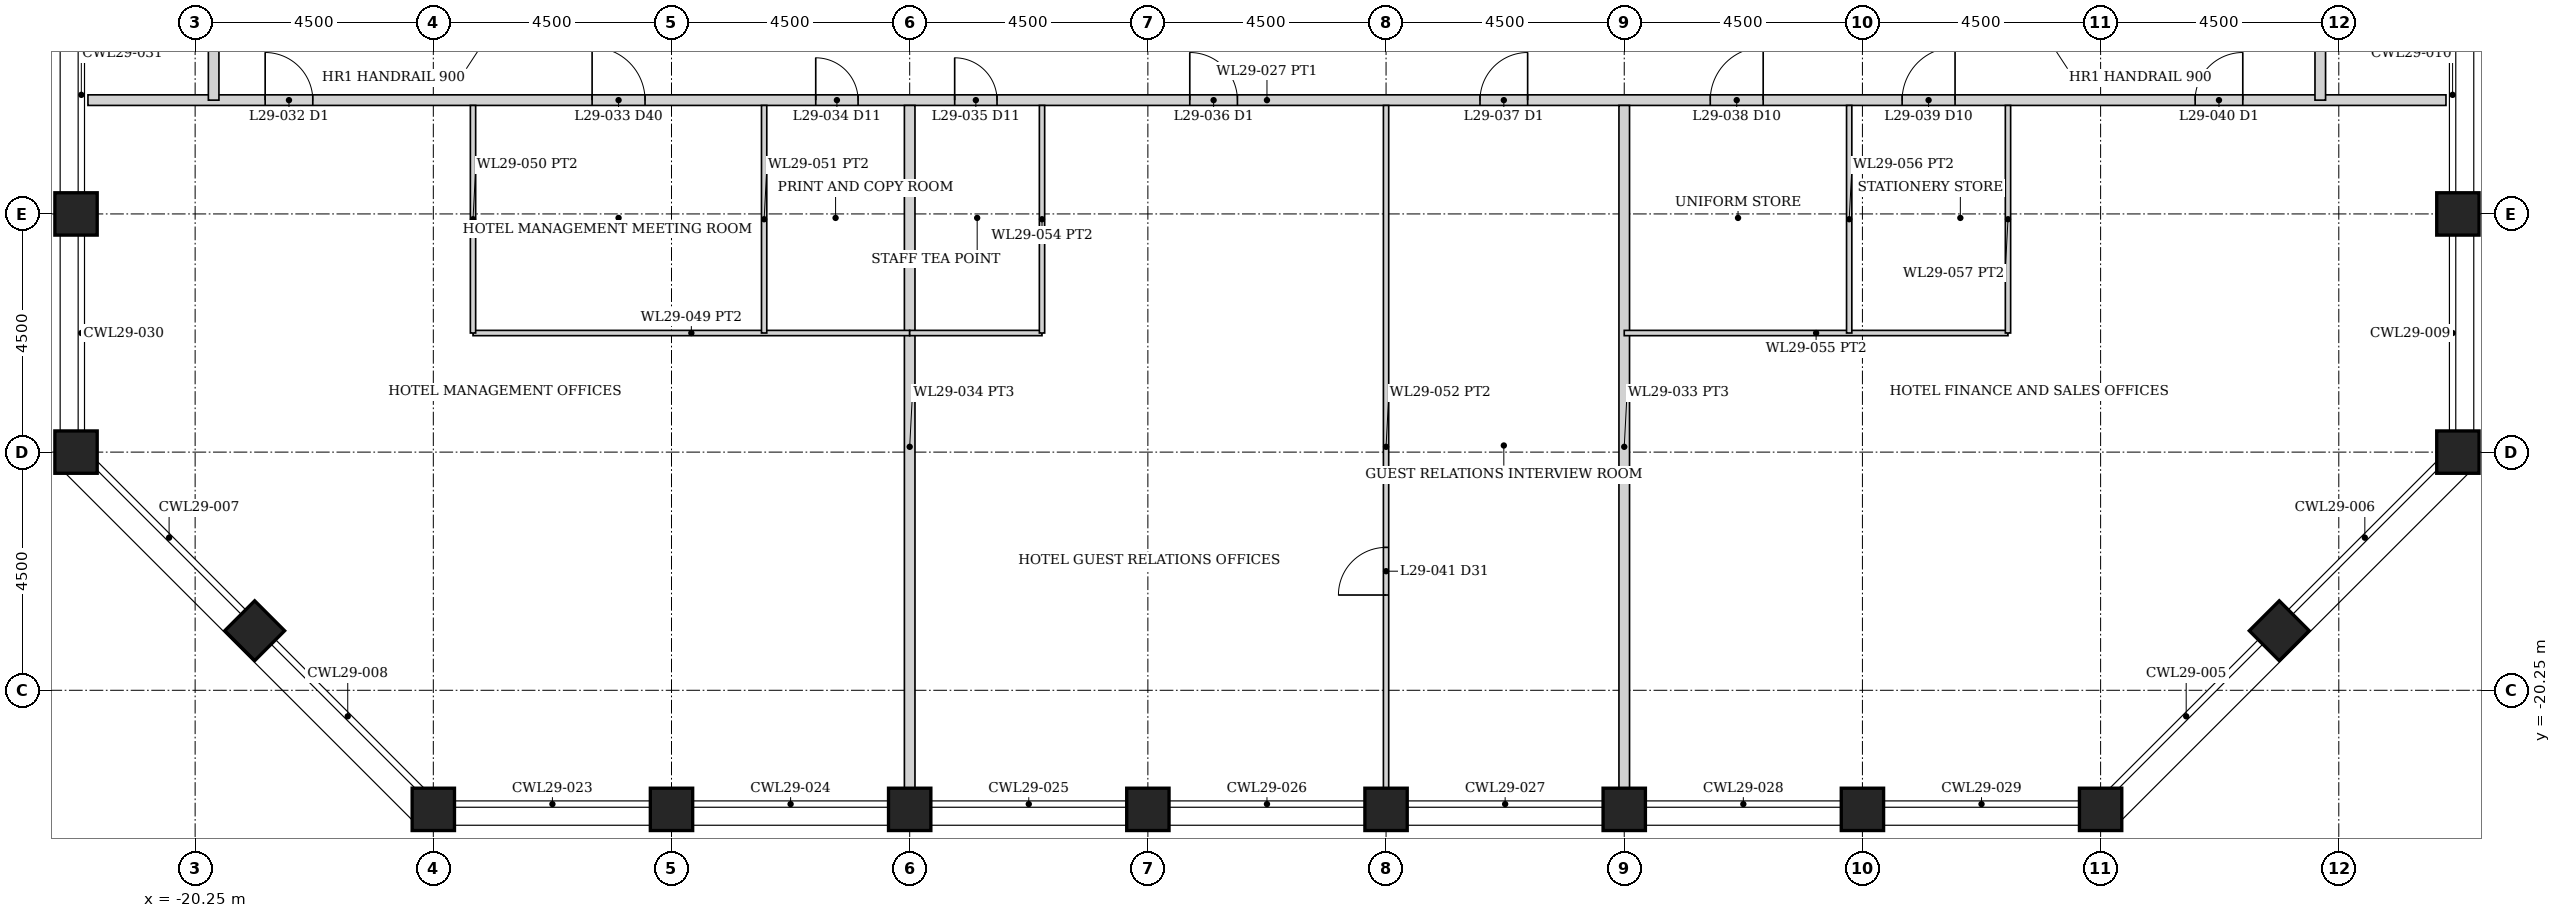
"""IFC4 building model, lengths in metres.
Left out: names, types, materials, properties, quantities, classifications, styles, units other than length and angle.
Written with IfcOpenShell. Run it as: python <this file> out.ifc"""

import sys

from ifc_helpers import new_model, si_unit, direction, frame, frame_2d, origin, origin_2d, place, context, subcontext, project, spatial, rectangle, hollow_rectangle, extrude, element, fill, save


model = new_model("IFC4")
c1 = context("Model", 3, precision=1e-05, world=origin(), true_north=direction((0.0, 1.0)))
c2 = subcontext(c1, "Body", "Model", "MODEL_VIEW")
j1 = project(units=[si_unit("LENGTHUNIT", "METRE"), si_unit("PLANEANGLEUNIT", "RADIAN")], contexts=[c1])
p1 = place(None, origin())
s1 = spatial("IfcSite", under=j1, at=p1, CompositionType="ELEMENT")
p2 = place(p1, origin())
s2 = spatial("IfcBuilding", under=s1, at=p2, CompositionType="ELEMENT")
p3 = place(p2, frame((0.0, 0.0, 112.4)))
s3 = spatial("IfcBuildingStorey", under=s2, at=p3, CompositionType="ELEMENT", Elevation=112.4)
for number, where, z_axis, x_axis in (
    (1, (-15.75, -22.5, 0.0), (0.0, 0.0, 1.0), (0.0, 1.0, 0.0)),
    (2, (22.5, -15.75, 0.0), (0.0, 0.0, 1.0), (1.0, 0.0, 0.0)),
    (3, (-22.5, -15.75, 0.0), (0.0, 0.0, 1.0), (1.0, 0.0, 0.0)),
    (4, (-11.25, -22.5, 0.0), (0.0, 0.0, 1.0), (0.0, 1.0, 0.0)),
    (5, (22.5, -11.25, 0.0), (0.0, 0.0, 1.0), (1.0, 0.0, 0.0)),
    (6, (-22.5, -11.25, 0.0), (0.0, 0.0, 1.0), (1.0, 0.0, 0.0)),
    (7, (-6.75, -22.5, 0.0), (0.0, 0.0, 1.0), (0.0, 1.0, 0.0)),
    (8, (-2.25, -22.5, 0.0), (0.0, 0.0, 1.0), (0.0, 1.0, 0.0)),
    (9, (2.25, -22.5, 0.0), (0.0, 0.0, 1.0), (0.0, 1.0, 0.0)),
    (10, (6.75, -22.5, 0.0), (0.0, 0.0, 1.0), (0.0, 1.0, 0.0)),
    (11, (11.25, -22.5, 0.0), (0.0, 0.0, 1.0), (0.0, 1.0, 0.0)),
    (12, (15.75, -22.5, 0.0), (0.0, 0.0, 1.0), (0.0, 1.0, 0.0)),
    (13, (19.125, -19.125, 0.0), (0.0, 0.0, 1.0), (0.707, -0.707, 0.0)),
    (14, (-19.125, -19.125, 0.0), (0.0, 0.0, 1.0), (0.707, 0.707, 0.0)),
):
    element("IfcColumn", number, at=place(p3, frame(where, z_axis=z_axis, x_axis=x_axis)), inside=s3, PredefinedType="COLUMN", context=c2, shape_type="SweptSolid", body=[
        extrude(hollow_rectangle(XDim=0.8, YDim=0.8, WallThickness=0.06, at=origin_2d()), origin(), (0.0, 0.0, 1.0), 6.0),
    ])
p4 = place(p3, frame((-22.275, -9.1, 0.0), z_axis=(0.0, 0.0, 1.0), x_axis=(1.0, 0.0, 0.0)))
e15 = element("IfcWall", 15, at=p4, inside=s3, PredefinedType="PARTITIONING", context=c2, shape_type="SweptSolid", body=[
    extrude(rectangle(XDim=44.55, YDim=0.2, at=frame_2d((22.275, 0.0))), origin(), (0.0, 0.0, 1.0), 4.874),
])
p5 = place(p4, frame((3.348, 0.0, 0.0)))
e16 = element("IfcOpeningElement", 16, at=p5, cuts=e15, PredefinedType="OPENING", context=c2, shape_type="SweptSolid", body=[
    extrude(rectangle(XDim=0.9, YDim=2.1, at=frame_2d((0.45, 1.05))), frame((0.0, 0.11, 0.0), z_axis=(0.0, -1.0, 0.0), x_axis=(1.0, 0.0, 0.0)), (0.0, 0.0, 1.0), 0.22),
])
p6 = place(p4, frame((9.525, 0.0, 0.0)))
e17 = element("IfcOpeningElement", 17, at=p6, cuts=e15, PredefinedType="OPENING", context=c2, shape_type="SweptSolid", body=[
    extrude(rectangle(XDim=1.0, YDim=2.1, at=frame_2d((0.5, 1.05))), frame((0.0, 0.11, 0.0), z_axis=(0.0, -1.0, 0.0), x_axis=(1.0, 0.0, 0.0)), (0.0, 0.0, 1.0), 0.22),
])
p7 = place(p4, frame((13.75, 0.0, 0.0)))
e18 = element("IfcOpeningElement", 18, at=p7, cuts=e15, PredefinedType="OPENING", context=c2, shape_type="SweptSolid", body=[
    extrude(rectangle(XDim=0.8, YDim=2.1, at=frame_2d((0.4, 1.05))), frame((0.0, 0.11, 0.0), z_axis=(0.0, -1.0, 0.0), x_axis=(1.0, 0.0, 0.0)), (0.0, 0.0, 1.0), 0.22),
])
p8 = place(p4, frame((20.817, 0.0, 0.0)))
e19 = element("IfcOpeningElement", 19, at=p8, cuts=e15, PredefinedType="OPENING", context=c2, shape_type="SweptSolid", body=[
    extrude(rectangle(XDim=0.9, YDim=2.1, at=frame_2d((0.45, 1.05))), frame((0.0, 0.11, 0.0), z_axis=(0.0, -1.0, 0.0), x_axis=(1.0, 0.0, 0.0)), (0.0, 0.0, 1.0), 0.22),
])
p9 = place(p4, frame((26.3, 0.0, 0.0)))
e20 = element("IfcOpeningElement", 20, at=p9, cuts=e15, PredefinedType="OPENING", context=c2, shape_type="SweptSolid", body=[
    extrude(rectangle(XDim=0.9, YDim=2.1, at=frame_2d((0.45, 1.05))), frame((0.0, 0.11, 0.0), z_axis=(0.0, -1.0, 0.0), x_axis=(1.0, 0.0, 0.0)), (0.0, 0.0, 1.0), 0.22),
])
p10 = place(p4, frame((16.375, 0.0, 0.0)))
e21 = element("IfcOpeningElement", 21, at=p10, cuts=e15, PredefinedType="OPENING", context=c2, shape_type="SweptSolid", body=[
    extrude(rectangle(XDim=0.8, YDim=2.1, at=frame_2d((0.4, 1.05))), frame((0.0, 0.11, 0.0), z_axis=(0.0, -1.0, 0.0), x_axis=(1.0, 0.0, 0.0)), (0.0, 0.0, 1.0), 0.22),
])
p11 = place(p4, frame((39.811, 0.0, 0.0)))
e22 = element("IfcOpeningElement", 22, at=p11, cuts=e15, PredefinedType="OPENING", context=c2, shape_type="SweptSolid", body=[
    extrude(rectangle(XDim=0.9, YDim=2.1, at=frame_2d((0.45, 1.05))), frame((0.0, 0.11, 0.0), z_axis=(0.0, -1.0, 0.0), x_axis=(1.0, 0.0, 0.0)), (0.0, 0.0, 1.0), 0.22),
])
p12 = place(p4, frame((30.65, 0.0, 0.0)))
e23 = element("IfcOpeningElement", 23, at=p12, cuts=e15, PredefinedType="OPENING", context=c2, shape_type="SweptSolid", body=[
    extrude(rectangle(XDim=1.0, YDim=2.1, at=frame_2d((0.5, 1.05))), frame((0.0, 0.11, 0.0), z_axis=(0.0, -1.0, 0.0), x_axis=(1.0, 0.0, 0.0)), (0.0, 0.0, 1.0), 0.22),
])
p13 = place(p4, frame((34.275, 0.0, 0.0)))
e24 = element("IfcOpeningElement", 24, at=p13, cuts=e15, PredefinedType="OPENING", context=c2, shape_type="SweptSolid", body=[
    extrude(rectangle(XDim=1.0, YDim=2.1, at=frame_2d((0.5, 1.05))), frame((0.0, 0.11, 0.0), z_axis=(0.0, -1.0, 0.0), x_axis=(1.0, 0.0, 0.0)), (0.0, 0.0, 1.0), 0.22),
])
p14 = place(p3, frame((19.9, -9.1, 0.0), z_axis=(0.0, 0.0, 1.0), x_axis=(0.0, 1.0, 0.0)))
e25 = element("IfcWall", 25, at=p14, inside=s3, PredefinedType="PARTITIONING", context=c2, shape_type="SweptSolid", body=[
    extrude(rectangle(XDim=18.2, YDim=0.2, at=frame_2d((9.1, 0.0))), origin(), (0.0, 0.0, 1.0), 4.874),
])
p15 = place(p14, frame((2.975, 0.0, 0.0)))
e26 = element("IfcOpeningElement", 26, at=p15, cuts=e25, PredefinedType="OPENING", context=c2, shape_type="SweptSolid", body=[
    extrude(rectangle(XDim=1.0, YDim=2.1, at=frame_2d((0.5, 1.05))), frame((0.0, 0.11, 0.0), z_axis=(0.0, -1.0, 0.0), x_axis=(1.0, 0.0, 0.0)), (0.0, 0.0, 1.0), 0.22),
])
p16 = place(p14, frame((8.6, 0.0, 0.0)))
e27 = element("IfcOpeningElement", 27, at=p16, cuts=e25, PredefinedType="OPENING", context=c2, shape_type="SweptSolid", body=[
    extrude(rectangle(XDim=1.0, YDim=2.1, at=frame_2d((0.5, 1.05))), frame((0.0, 0.11, 0.0), z_axis=(0.0, -1.0, 0.0), x_axis=(1.0, 0.0, 0.0)), (0.0, 0.0, 1.0), 0.22),
])
p17 = place(p14, frame((13.1, 0.0, 0.0)))
e28 = element("IfcOpeningElement", 28, at=p17, cuts=e25, PredefinedType="OPENING", context=c2, shape_type="SweptSolid", body=[
    extrude(rectangle(XDim=1.0, YDim=2.1, at=frame_2d((0.5, 1.05))), frame((0.0, 0.11, 0.0), z_axis=(0.0, -1.0, 0.0), x_axis=(1.0, 0.0, 0.0)), (0.0, 0.0, 1.0), 0.22),
])
p18 = place(p14, frame((16.575, 0.0, 0.0)))
e29 = element("IfcOpeningElement", 29, at=p18, cuts=e25, PredefinedType="OPENING", context=c2, shape_type="SweptSolid", body=[
    extrude(rectangle(XDim=0.8, YDim=2.1, at=frame_2d((0.4, 1.05))), frame((0.0, 0.11, 0.0), z_axis=(0.0, -1.0, 0.0), x_axis=(1.0, 0.0, 0.0)), (0.0, 0.0, 1.0), 0.22),
])
p19 = place(p3, frame((-19.9, -9.1, 0.0), z_axis=(0.0, 0.0, 1.0), x_axis=(0.0, 1.0, 0.0)))
e30 = element("IfcWall", 30, at=p19, inside=s3, PredefinedType="PARTITIONING", context=c2, shape_type="SweptSolid", body=[
    extrude(rectangle(XDim=18.2, YDim=0.2, at=frame_2d((9.1, 0.0))), origin(), (0.0, 0.0, 1.0), 4.874),
])
p20 = place(p19, frame((13.95, 0.0, 0.0)))
e31 = element("IfcOpeningElement", 31, at=p20, cuts=e30, PredefinedType="OPENING", context=c2, shape_type="SweptSolid", body=[
    extrude(rectangle(XDim=1.5, YDim=2.4, at=frame_2d((0.75, 1.2))), frame((0.0, 0.11, 0.0), z_axis=(0.0, -1.0, 0.0), x_axis=(1.0, 0.0, 0.0)), (0.0, 0.0, 1.0), 0.22),
])
p21 = place(p19, frame((5.25, 0.0, 0.0)))
e32 = element("IfcOpeningElement", 32, at=p21, cuts=e30, PredefinedType="OPENING", context=c2, shape_type="SweptSolid", body=[
    extrude(rectangle(XDim=0.9, YDim=2.1, at=frame_2d((0.45, 1.05))), frame((0.0, 0.11, 0.0), z_axis=(0.0, -1.0, 0.0), x_axis=(1.0, 0.0, 0.0)), (0.0, 0.0, 1.0), 0.22),
])
for number, where, z_axis, x_axis in (
    (33, (-6.75, -22.1, 0.0), (0.0, 0.0, 1.0), (0.0, 1.0, 0.0)),
    (34, (6.75, -22.1, 0.0), (0.0, 0.0, 1.0), (0.0, 1.0, 0.0)),
):
    element("IfcWall", number, at=place(p3, frame(where, z_axis=z_axis, x_axis=x_axis)), inside=s3, PredefinedType="PARTITIONING", context=c2, shape_type="SweptSolid", body=[
        extrude(rectangle(XDim=12.9, YDim=0.2, at=frame_2d((6.45, 0.0))), origin(), (0.0, 0.0, 1.0), 4.874),
    ])
p22 = place(p3, frame((-15.0, -13.5, 0.0), z_axis=(0.0, 0.0, 1.0), x_axis=(1.0, 0.0, 0.0)))
e35 = element("IfcWall", 35, at=p22, inside=s3, PredefinedType="PARTITIONING", context=c2, shape_type="SweptSolid", body=[
    extrude(rectangle(XDim=8.25, YDim=0.1, at=frame_2d((4.125, 0.0))), origin(), (0.0, 0.0, 1.0), 4.874),
])
for number, where, z_axis, x_axis in (
    (36, (-15.0, -13.5, 0.0), (0.0, 0.0, 1.0), (0.0, 1.0, 0.0)),
    (37, (-9.5, -13.5, 0.0), (0.0, 0.0, 1.0), (0.0, 1.0, 0.0)),
):
    element("IfcWall", number, at=place(p3, frame(where, z_axis=z_axis, x_axis=x_axis)), inside=s3, PredefinedType="PARTITIONING", context=c2, shape_type="SweptSolid", body=[
        extrude(rectangle(XDim=4.3, YDim=0.1, at=frame_2d((2.15, 0.0))), origin(), (0.0, 0.0, 1.0), 4.874),
    ])
p23 = place(p3, frame((-6.75, -13.5, 0.0), z_axis=(0.0, 0.0, 1.0), x_axis=(1.0, 0.0, 0.0)))
e38 = element("IfcWall", 38, at=p23, inside=s3, PredefinedType="PARTITIONING", context=c2, shape_type="SweptSolid", body=[
    extrude(rectangle(XDim=2.5, YDim=0.1, at=frame_2d((1.25, 0.0))), origin(), (0.0, 0.0, 1.0), 4.874),
])
p24 = place(p3, frame((-4.25, -13.5, 0.0), z_axis=(0.0, 0.0, 1.0), x_axis=(0.0, 1.0, 0.0)))
e39 = element("IfcWall", 39, at=p24, inside=s3, PredefinedType="PARTITIONING", context=c2, shape_type="SweptSolid", body=[
    extrude(rectangle(XDim=4.3, YDim=0.1, at=frame_2d((2.15, 0.0))), origin(), (0.0, 0.0, 1.0), 4.874),
])
p25 = place(p3, frame((2.25, -22.1, 0.0), z_axis=(0.0, 0.0, 1.0), x_axis=(0.0, 1.0, 0.0)))
e40 = element("IfcWall", 40, at=p25, inside=s3, PredefinedType="PARTITIONING", context=c2, shape_type="SweptSolid", body=[
    extrude(rectangle(XDim=12.9, YDim=0.1, at=frame_2d((6.45, 0.0))), origin(), (0.0, 0.0, 1.0), 4.874),
])
p26 = place(p25, frame((3.65, 0.0, 0.0)))
e41 = element("IfcOpeningElement", 41, at=p26, cuts=e40, PredefinedType="OPENING", context=c2, shape_type="SweptSolid", body=[
    extrude(rectangle(XDim=0.9, YDim=2.1, at=frame_2d((0.45, 1.05))), frame((0.0, 0.06, 0.0), z_axis=(0.0, -1.0, 0.0), x_axis=(1.0, 0.0, 0.0)), (0.0, 0.0, 1.0), 0.12),
])
p27 = place(p3, frame((6.75, -13.5, 0.0), z_axis=(0.0, 0.0, 1.0), x_axis=(1.0, 0.0, 0.0)))
e42 = element("IfcWall", 42, at=p27, inside=s3, PredefinedType="PARTITIONING", context=c2, shape_type="SweptSolid", body=[
    extrude(rectangle(XDim=7.25, YDim=0.1, at=frame_2d((3.625, 0.0))), origin(), (0.0, 0.0, 1.0), 4.874),
])
for number, where, z_axis, x_axis in (
    (43, (11.0, -13.5, 0.0), (0.0, 0.0, 1.0), (0.0, 1.0, 0.0)),
    (44, (14.0, -13.5, 0.0), (0.0, 0.0, 1.0), (0.0, 1.0, 0.0)),
):
    element("IfcWall", number, at=place(p3, frame(where, z_axis=z_axis, x_axis=x_axis)), inside=s3, PredefinedType="PARTITIONING", context=c2, shape_type="SweptSolid", body=[
        extrude(rectangle(XDim=4.3, YDim=0.1, at=frame_2d((2.15, 0.0))), origin(), (0.0, 0.0, 1.0), 4.874),
    ])
p28 = place(p5, origin())
e45 = element("IfcDoor", 45, at=p28, inside=s3, OperationType="SINGLE_SWING_LEFT", PredefinedType="DOOR", context=c2, shape_type="SweptSolid", body=[
    extrude(rectangle(XDim=0.9, YDim=2.1, at=frame_2d((0.45, 1.05))), frame((0.0, 0.025, 0.0), z_axis=(0.0, -1.0, 0.0), x_axis=(1.0, 0.0, 0.0)), (0.0, 0.0, 1.0), 0.05),
])
fill(e16, e45)
p29 = place(p6, origin())
e46 = element("IfcDoor", 46, at=p29, inside=s3, OperationType="SINGLE_SWING_LEFT", PredefinedType="DOOR", context=c2, shape_type="SweptSolid", body=[
    extrude(rectangle(XDim=1.0, YDim=2.1, at=frame_2d((0.5, 1.05))), frame((0.0, 0.025, 0.0), z_axis=(0.0, -1.0, 0.0), x_axis=(1.0, 0.0, 0.0)), (0.0, 0.0, 1.0), 0.05),
])
fill(e17, e46)
p30 = place(p7, origin())
e47 = element("IfcDoor", 47, at=p30, inside=s3, OperationType="SINGLE_SWING_LEFT", PredefinedType="DOOR", context=c2, shape_type="SweptSolid", body=[
    extrude(rectangle(XDim=0.8, YDim=2.1, at=frame_2d((0.4, 1.05))), frame((0.0, 0.025, 0.0), z_axis=(0.0, -1.0, 0.0), x_axis=(1.0, 0.0, 0.0)), (0.0, 0.0, 1.0), 0.05),
])
fill(e18, e47)
p31 = place(p8, origin())
e48 = element("IfcDoor", 48, at=p31, inside=s3, OperationType="SINGLE_SWING_LEFT", PredefinedType="DOOR", context=c2, shape_type="SweptSolid", body=[
    extrude(rectangle(XDim=0.9, YDim=2.1, at=frame_2d((0.45, 1.05))), frame((0.0, 0.025, 0.0), z_axis=(0.0, -1.0, 0.0), x_axis=(1.0, 0.0, 0.0)), (0.0, 0.0, 1.0), 0.05),
])
fill(e19, e48)
p32 = place(p9, origin())
e49 = element("IfcDoor", 49, at=p32, inside=s3, OperationType="SINGLE_SWING_RIGHT", PredefinedType="DOOR", context=c2, shape_type="SweptSolid", body=[
    extrude(rectangle(XDim=0.9, YDim=2.1, at=frame_2d((0.45, 1.05))), frame((0.0, 0.025, 0.0), z_axis=(0.0, -1.0, 0.0), x_axis=(1.0, 0.0, 0.0)), (0.0, 0.0, 1.0), 0.05),
])
fill(e20, e49)
p33 = place(p10, origin())
e50 = element("IfcDoor", 50, at=p33, inside=s3, OperationType="SINGLE_SWING_LEFT", PredefinedType="DOOR", context=c2, shape_type="SweptSolid", body=[
    extrude(rectangle(XDim=0.8, YDim=2.1, at=frame_2d((0.4, 1.05))), frame((0.0, 0.025, 0.0), z_axis=(0.0, -1.0, 0.0), x_axis=(1.0, 0.0, 0.0)), (0.0, 0.0, 1.0), 0.05),
])
fill(e21, e50)
p34 = place(p26, origin())
e51 = element("IfcDoor", 51, at=p34, inside=s3, OperationType="SINGLE_SWING_LEFT", PredefinedType="DOOR", context=c2, shape_type="SweptSolid", body=[
    extrude(rectangle(XDim=0.9, YDim=2.1, at=frame_2d((0.45, 1.05))), frame((0.0, 0.025, 0.0), z_axis=(0.0, -1.0, 0.0), x_axis=(1.0, 0.0, 0.0)), (0.0, 0.0, 1.0), 0.05),
])
fill(e41, e51)
p35 = place(p11, origin())
e52 = element("IfcDoor", 52, at=p35, inside=s3, OperationType="SINGLE_SWING_RIGHT", PredefinedType="DOOR", context=c2, shape_type="SweptSolid", body=[
    extrude(rectangle(XDim=0.9, YDim=2.1, at=frame_2d((0.45, 1.05))), frame((0.0, 0.025, 0.0), z_axis=(0.0, -1.0, 0.0), x_axis=(1.0, 0.0, 0.0)), (0.0, 0.0, 1.0), 0.05),
])
fill(e22, e52)
p36 = place(p12, origin())
e53 = element("IfcDoor", 53, at=p36, inside=s3, OperationType="SINGLE_SWING_RIGHT", PredefinedType="DOOR", context=c2, shape_type="SweptSolid", body=[
    extrude(rectangle(XDim=1.0, YDim=2.1, at=frame_2d((0.5, 1.05))), frame((0.0, 0.025, 0.0), z_axis=(0.0, -1.0, 0.0), x_axis=(1.0, 0.0, 0.0)), (0.0, 0.0, 1.0), 0.05),
])
fill(e23, e53)
p37 = place(p13, origin())
e54 = element("IfcDoor", 54, at=p37, inside=s3, OperationType="SINGLE_SWING_RIGHT", PredefinedType="DOOR", context=c2, shape_type="SweptSolid", body=[
    extrude(rectangle(XDim=1.0, YDim=2.1, at=frame_2d((0.5, 1.05))), frame((0.0, 0.025, 0.0), z_axis=(0.0, -1.0, 0.0), x_axis=(1.0, 0.0, 0.0)), (0.0, 0.0, 1.0), 0.05),
])
fill(e24, e54)
save(model, sys.argv[1])
